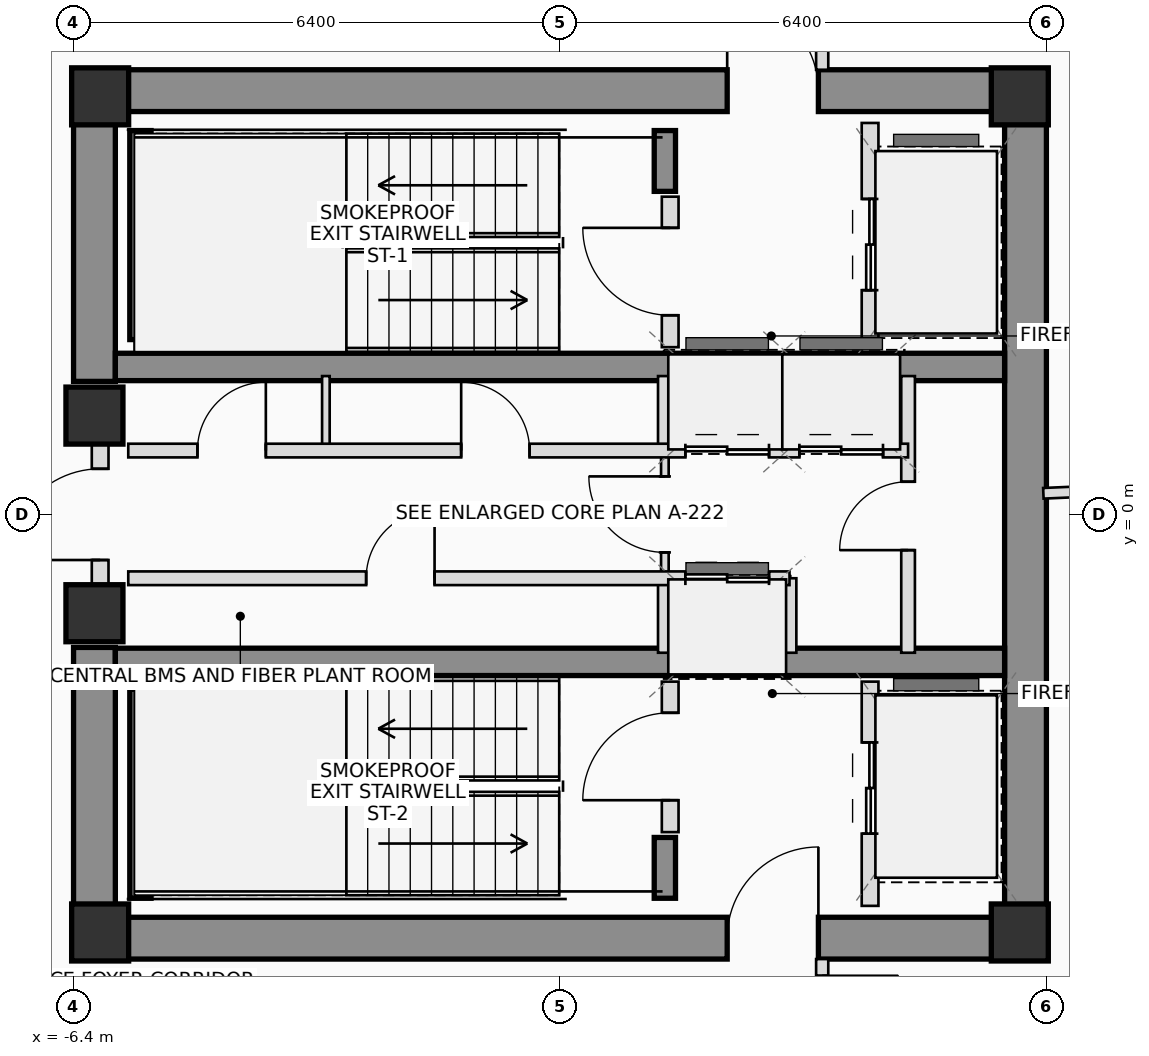
"""IFC4 building model, lengths in metres.
Left out: names, types, materials, properties, quantities, classifications, styles, units other than length and angle.
Written with IfcOpenShell. Run it as: python <this file> out.ifc"""

import sys

from ifc_helpers import new_model, si_unit, direction, frame, frame_2d, origin, origin_2d, place, context, subcontext, project, spatial, rectangle, extrude, source, transform, mapped, element, fill, save


model = new_model("IFC4")
c1 = context("Model", 3, precision=1e-05, world=origin(), true_north=direction((0.0, 1.0)))
c2 = subcontext(c1, "Body", "Model", "MODEL_VIEW")
j1 = project(units=[si_unit("LENGTHUNIT", "METRE"), si_unit("PLANEANGLEUNIT", "RADIAN")], contexts=[c1])
p1 = place(None, origin())
s1 = spatial("IfcSite", under=j1, at=p1, CompositionType="ELEMENT")
p2 = place(p1, origin())
s2 = spatial("IfcBuilding", under=s1, at=p2, CompositionType="ELEMENT")
p3 = place(p2, frame((0.0, 0.0, 242.25)))
s3 = spatial("IfcBuildingStorey", under=s2, at=p3, CompositionType="ELEMENT", Elevation=242.25)
m1 = source(origin(), c2, "Body", "SweptSolid", [
    extrude(rectangle(XDim=0.75, YDim=0.75, at=origin_2d()), origin(), (0.0, 0.0, 1.0), 3.4),
])
for number, where, z_axis, x_axis in (
    (1, (-6.05, -5.5, 0.0), (0.0, 0.0, 1.0), (1.0, 0.0, 0.0)),
    (2, (6.05, -5.5, 0.0), (0.0, 0.0, 1.0), (1.0, 0.0, 0.0)),
    (3, (6.05, 5.5, 0.0), (0.0, 0.0, 1.0), (1.0, 0.0, 0.0)),
    (4, (-6.05, 5.5, 0.0), (0.0, 0.0, 1.0), (1.0, 0.0, 0.0)),
):
    element("IfcColumn", number, at=place(p3, frame(where, z_axis=z_axis, x_axis=x_axis)), inside=s3, PredefinedType="COLUMN", context=c2, shape_type="MappedRepresentation", body=[
        mapped(m1, transform((0.0, 0.0, 0.0), scale=1.0)),
    ])
p4 = place(p3, frame((-6.4, 5.575, 0.0), z_axis=(0.0, 0.0, 1.0), x_axis=(1.0, 0.0, 0.0)))
e5 = element("IfcWall", 5, at=p4, inside=s3, PredefinedType="SHEAR", context=c2, shape_type="SweptSolid", body=[
    extrude(rectangle(XDim=12.8, YDim=0.55, at=frame_2d((6.4, 0.0))), origin(), (0.0, 0.0, 1.0), 3.4),
])
p5 = place(p4, frame((8.6, 0.0, 0.0)))
e6 = element("IfcOpeningElement", 6, at=p5, cuts=e5, PredefinedType="OPENING", context=c2, shape_type="SweptSolid", body=[
    extrude(rectangle(XDim=1.2, YDim=2.2, at=frame_2d((0.6, 1.1))), frame((0.0, 0.285, 0.0), z_axis=(0.0, -1.0, 0.0), x_axis=(1.0, 0.0, 0.0)), (0.0, 0.0, 1.0), 0.57),
])
p6 = place(p3, frame((-6.4, -5.575, 0.0), z_axis=(0.0, 0.0, 1.0), x_axis=(1.0, 0.0, 0.0)))
e7 = element("IfcWall", 7, at=p6, inside=s3, PredefinedType="SHEAR", context=c2, shape_type="SweptSolid", body=[
    extrude(rectangle(XDim=12.8, YDim=0.55, at=frame_2d((6.4, 0.0))), origin(), (0.0, 0.0, 1.0), 3.4),
])
p7 = place(p6, frame((8.6, 0.0, 0.0)))
e8 = element("IfcOpeningElement", 8, at=p7, cuts=e7, PredefinedType="OPENING", context=c2, shape_type="SweptSolid", body=[
    extrude(rectangle(XDim=1.2, YDim=2.2, at=frame_2d((0.6, 1.1))), frame((0.0, 0.285, 0.0), z_axis=(0.0, -1.0, 0.0), x_axis=(1.0, 0.0, 0.0)), (0.0, 0.0, 1.0), 0.57),
])
p8 = place(p3, frame((6.125, -5.3, 0.0), z_axis=(0.0, 0.0, 1.0), x_axis=(0.0, 1.0, 0.0)))
e9 = element("IfcWall", 9, at=p8, inside=s3, PredefinedType="SHEAR", context=c2, shape_type="SweptSolid", body=[
    extrude(rectangle(XDim=10.6, YDim=0.55, at=frame_2d((5.3, 0.0))), origin(), (0.0, 0.0, 1.0), 3.4),
])
for number, where, z_axis, x_axis in (
    (10, (-6.125, -5.3, 0.0), (0.0, 0.0, 1.0), (0.0, 1.0, 0.0)),
    (11, (-6.125, 1.75, 0.0), (0.0, 0.0, 1.0), (0.0, 1.0, 0.0)),
):
    element("IfcWall", number, at=place(p3, frame(where, z_axis=z_axis, x_axis=x_axis)), inside=s3, PredefinedType="SHEAR", context=c2, shape_type="SweptSolid", body=[
        extrude(rectangle(XDim=3.55, YDim=0.55, at=frame_2d((1.775, 0.0))), origin(), (0.0, 0.0, 1.0), 3.4),
    ])
for number, where, z_axis, x_axis in (
    (12, (-5.85, 1.94, 0.0), (0.0, 0.0, 1.0), (1.0, 0.0, 0.0)),
    (13, (-5.85, -1.94, 0.0), (0.0, 0.0, 1.0), (1.0, 0.0, 0.0)),
):
    element("IfcWall", number, at=place(p3, frame(where, z_axis=z_axis, x_axis=x_axis)), inside=s3, PredefinedType="SHEAR", context=c2, shape_type="SweptSolid", body=[
        extrude(rectangle(XDim=11.7, YDim=0.36, at=frame_2d((5.85, 0.0))), origin(), (0.0, 0.0, 1.0), 3.4),
    ])
p9 = place(p3, frame((-5.52, 2.3, 0.0), z_axis=(0.0, 0.0, 1.0), x_axis=(0.0, 1.0, 0.0)))
e14 = element("IfcWall", 14, at=p9, inside=s3, PredefinedType="SHEAR", context=c2, shape_type="SweptSolid", body=[
    extrude(rectangle(XDim=2.75, YDim=0.28, at=frame_2d((1.375, 0.0))), origin(), (0.0, 0.0, 1.0), 3.4),
])
p10 = place(p3, frame((1.38, 4.25, 0.0), z_axis=(0.0, 0.0, 1.0), x_axis=(0.0, 1.0, 0.0)))
e15 = element("IfcWall", 15, at=p10, inside=s3, PredefinedType="SHEAR", context=c2, shape_type="SweptSolid", body=[
    extrude(rectangle(XDim=0.8, YDim=0.28, at=frame_2d((0.4, 0.0))), origin(), (0.0, 0.0, 1.0), 3.4),
])
p11 = place(p3, frame((-5.52, -5.05, 0.0), z_axis=(0.0, 0.0, 1.0), x_axis=(0.0, 1.0, 0.0)))
e16 = element("IfcWall", 16, at=p11, inside=s3, PredefinedType="SHEAR", context=c2, shape_type="SweptSolid", body=[
    extrude(rectangle(XDim=2.75, YDim=0.28, at=frame_2d((1.375, 0.0))), origin(), (0.0, 0.0, 1.0), 3.4),
])
p12 = place(p3, frame((1.38, -5.05, 0.0), z_axis=(0.0, 0.0, 1.0), x_axis=(0.0, 1.0, 0.0)))
e17 = element("IfcWall", 17, at=p12, inside=s3, PredefinedType="SHEAR", context=c2, shape_type="SweptSolid", body=[
    extrude(rectangle(XDim=0.8, YDim=0.28, at=frame_2d((0.4, 0.0))), origin(), (0.0, 0.0, 1.0), 3.4),
])
for number, where, z_axis, x_axis in (
    (18, (-6.125, -1.3, 0.0), (0.0, 0.0, 1.0), (1.0, 0.0, 0.0)),
    (19, (-6.125, 1.3, 0.0), (0.0, 0.0, 1.0), (1.0, 0.0, 0.0)),
):
    element("IfcColumn", number, at=place(p3, frame(where, z_axis=z_axis, x_axis=x_axis)), inside=s3, PredefinedType="COLUMN", context=c2, shape_type="MappedRepresentation", body=[
        mapped(m1, transform((0.0, 0.0, 0.0), scale=1.0)),
    ])
p13 = place(p3, frame((-6.05, -0.95, 0.0), z_axis=(0.0, 0.0, 1.0), x_axis=(0.0, 1.0, 0.0)))
e20 = element("IfcWall", 20, at=p13, inside=s3, PredefinedType="PLUMBINGWALL", context=c2, shape_type="SweptSolid", body=[
    extrude(rectangle(XDim=1.9, YDim=0.22, at=frame_2d((0.95, 0.0))), origin(), (0.0, 0.0, 1.0), 2.18),
])
p14 = place(p13, frame((0.35, 0.0, 0.0)))
e21 = element("IfcOpeningElement", 21, at=p14, cuts=e20, PredefinedType="OPENING", context=c2, shape_type="SweptSolid", body=[
    extrude(rectangle(XDim=1.2, YDim=2.2, at=frame_2d((0.6, 1.1))), frame((0.0, 0.12, 0.0), z_axis=(0.0, -1.0, 0.0), x_axis=(1.0, 0.0, 0.0)), (0.0, 0.0, 1.0), 0.24),
])
p15 = place(p3, frame((1.45, 2.2, 0.0), z_axis=(0.0, 0.0, 1.0), x_axis=(0.0, 1.0, 0.0)))
e22 = element("IfcWall", 22, at=p15, inside=s3, PredefinedType="PLUMBINGWALL", context=c2, shape_type="SweptSolid", body=[
    extrude(rectangle(XDim=1.98, YDim=0.22, at=frame_2d((0.99, 0.0))), origin(), (0.0, 0.0, 1.0), 3.2),
])
p16 = place(p15, frame((0.42, 0.0, 0.0)))
e23 = element("IfcOpeningElement", 23, at=p16, cuts=e22, PredefinedType="OPENING", context=c2, shape_type="SweptSolid", body=[
    extrude(rectangle(XDim=1.15, YDim=2.15, at=frame_2d((0.575, 1.075))), frame((0.0, 0.12, 0.0), z_axis=(0.0, -1.0, 0.0), x_axis=(1.0, 0.0, 0.0)), (0.0, 0.0, 1.0), 0.24),
])
p17 = place(p3, frame((4.08, 2.2, 0.0), z_axis=(0.0, 0.0, 1.0), x_axis=(0.0, 1.0, 0.0)))
e24 = element("IfcWall", 24, at=p17, inside=s3, PredefinedType="PLUMBINGWALL", context=c2, shape_type="SweptSolid", body=[
    extrude(rectangle(XDim=2.95, YDim=0.22, at=frame_2d((1.475, 0.0))), origin(), (0.0, 0.0, 1.0), 3.2),
])
p18 = place(p17, frame((0.75, 0.0, 0.0)))
e25 = element("IfcOpeningElement", 25, at=p18, cuts=e24, PredefinedType="OPENING", context=c2, shape_type="SweptSolid", body=[
    extrude(rectangle(XDim=1.2, YDim=2.25, at=frame_2d((0.6, 1.125))), frame((0.0, 0.12, 0.0), z_axis=(0.0, -1.0, 0.0), x_axis=(1.0, 0.0, 0.0)), (0.0, 0.0, 1.0), 0.24),
])
p19 = place(p3, frame((1.45, -4.18, 0.0), z_axis=(0.0, 0.0, 1.0), x_axis=(0.0, 1.0, 0.0)))
e26 = element("IfcWall", 26, at=p19, inside=s3, PredefinedType="PLUMBINGWALL", context=c2, shape_type="SweptSolid", body=[
    extrude(rectangle(XDim=1.98, YDim=0.22, at=frame_2d((0.99, 0.0))), origin(), (0.0, 0.0, 1.0), 3.2),
])
p20 = place(p19, frame((0.42, 0.0, 0.0)))
e27 = element("IfcOpeningElement", 27, at=p20, cuts=e26, PredefinedType="OPENING", context=c2, shape_type="SweptSolid", body=[
    extrude(rectangle(XDim=1.15, YDim=2.15, at=frame_2d((0.575, 1.075))), frame((0.0, 0.12, 0.0), z_axis=(0.0, -1.0, 0.0), x_axis=(1.0, 0.0, 0.0)), (0.0, 0.0, 1.0), 0.24),
])
p21 = place(p3, frame((4.08, -5.15, 0.0), z_axis=(0.0, 0.0, 1.0), x_axis=(0.0, 1.0, 0.0)))
e28 = element("IfcWall", 28, at=p21, inside=s3, PredefinedType="PLUMBINGWALL", context=c2, shape_type="SweptSolid", body=[
    extrude(rectangle(XDim=2.95, YDim=0.22, at=frame_2d((1.475, 0.0))), origin(), (0.0, 0.0, 1.0), 3.2),
])
p22 = place(p21, frame((0.95, 0.0, 0.0)))
e29 = element("IfcOpeningElement", 29, at=p22, cuts=e28, PredefinedType="OPENING", context=c2, shape_type="SweptSolid", body=[
    extrude(rectangle(XDim=1.2, YDim=2.25, at=frame_2d((0.6, 1.125))), frame((0.0, 0.12, 0.0), z_axis=(0.0, -1.0, 0.0), x_axis=(1.0, 0.0, 0.0)), (0.0, 0.0, 1.0), 0.24),
])
p23 = place(p3, frame((1.38, -0.84, 0.0), z_axis=(0.0, 0.0, 1.0), x_axis=(0.0, 1.0, 0.0)))
e30 = element("IfcWall", 30, at=p23, inside=s3, PredefinedType="PARTITIONING", context=c2, shape_type="SweptSolid", body=[
    extrude(rectangle(XDim=1.68, YDim=0.1, at=frame_2d((0.84, 0.0))), origin(), (0.0, 0.0, 1.0), 3.2),
])
p24 = place(p23, frame((0.34, 0.0, 0.0)))
e31 = element("IfcOpeningElement", 31, at=p24, cuts=e30, PredefinedType="OPENING", context=c2, shape_type="SweptSolid", body=[
    extrude(rectangle(XDim=1.0, YDim=2.25, at=frame_2d((0.5, 1.125))), frame((0.0, 0.06, 0.0), z_axis=(0.0, -1.0, 0.0), x_axis=(1.0, 0.0, 0.0)), (0.0, 0.0, 1.0), 0.12),
])
p25 = place(p3, frame((-3.08, 0.84, 0.0), z_axis=(0.0, 0.0, 1.0), x_axis=(0.0, 1.0, 0.0)))
e32 = element("IfcWall", 32, at=p25, inside=s3, PredefinedType="PARTITIONING", context=c2, shape_type="SweptSolid", body=[
    extrude(rectangle(XDim=0.98, YDim=0.1, at=frame_2d((0.49, 0.0))), origin(), (0.0, 0.0, 1.0), 3.2),
])
for number, where, z_axis, x_axis in (
    (33, (1.38, 0.84, 0.0), (0.0, 0.0, 1.0), (0.0, 1.0, 0.0)),
    (34, (1.38, -1.82, 0.0), (0.0, 0.0, 1.0), (0.0, 1.0, 0.0)),
    (35, (3.02, 0.84, 0.0), (0.0, 0.0, 1.0), (0.0, 1.0, 0.0)),
    (36, (4.38, 0.84, 0.0), (0.0, 0.0, 1.0), (0.0, 1.0, 0.0)),
    (37, (3.02, -1.82, 0.0), (0.0, 0.0, 1.0), (0.0, 1.0, 0.0)),
):
    element("IfcWall", number, at=place(p3, frame(where, z_axis=z_axis, x_axis=x_axis)), inside=s3, PredefinedType="PLUMBINGWALL", context=c2, shape_type="SweptSolid", body=[
        extrude(rectangle(XDim=0.98, YDim=0.18, at=frame_2d((0.49, 0.0))), origin(), (0.0, 0.0, 1.0), 3.2),
    ])
p26 = place(p3, frame((4.58, -1.82, 0.0), z_axis=(0.0, 0.0, 1.0), x_axis=(0.0, 1.0, 0.0)))
e38 = element("IfcWall", 38, at=p26, inside=s3, PredefinedType="PLUMBINGWALL", context=c2, shape_type="SweptSolid", body=[
    extrude(rectangle(XDim=3.64, YDim=0.18, at=frame_2d((1.82, 0.0))), origin(), (0.0, 0.0, 1.0), 3.2),
])
p27 = place(p26, frame((1.35, 0.0, 0.0)))
e39 = element("IfcOpeningElement", 39, at=p27, cuts=e38, PredefinedType="OPENING", context=c2, shape_type="SweptSolid", body=[
    extrude(rectangle(XDim=0.9, YDim=2.05, at=frame_2d((0.45, 1.025))), frame((0.0, 0.1, 0.0), z_axis=(0.0, -1.0, 0.0), x_axis=(1.0, 0.0, 0.0)), (0.0, 0.0, 1.0), 0.2),
])
p28 = place(p3, frame((-5.68, 0.84, 0.0), z_axis=(0.0, 0.0, 1.0), x_axis=(1.0, 0.0, 0.0)))
e40 = element("IfcWall", 40, at=p28, inside=s3, PredefinedType="PLUMBINGWALL", context=c2, shape_type="SweptSolid", body=[
    extrude(rectangle(XDim=10.26, YDim=0.18, at=frame_2d((5.13, 0.0))), origin(), (0.0, 0.0, 1.0), 3.2),
])
p29 = place(p28, frame((0.91, 0.0, 0.0)))
e41 = element("IfcOpeningElement", 41, at=p29, cuts=e40, PredefinedType="OPENING", context=c2, shape_type="SweptSolid", body=[
    extrude(rectangle(XDim=0.9, YDim=2.05, at=frame_2d((0.45, 1.025))), frame((0.0, 0.1, 0.0), z_axis=(0.0, -1.0, 0.0), x_axis=(1.0, 0.0, 0.0)), (0.0, 0.0, 1.0), 0.2),
])
p30 = place(p28, frame((4.38, 0.0, 0.0)))
e42 = element("IfcOpeningElement", 42, at=p30, cuts=e40, PredefinedType="OPENING", context=c2, shape_type="SweptSolid", body=[
    extrude(rectangle(XDim=0.9, YDim=2.05, at=frame_2d((0.45, 1.025))), frame((0.0, 0.1, 0.0), z_axis=(0.0, -1.0, 0.0), x_axis=(1.0, 0.0, 0.0)), (0.0, 0.0, 1.0), 0.2),
])
p31 = place(p28, frame((7.33, 0.0, 0.0)))
e43 = element("IfcOpeningElement", 43, at=p31, cuts=e40, PredefinedType="OPENING", context=c2, shape_type="SweptSolid", body=[
    extrude(rectangle(XDim=1.1, YDim=2.2, at=frame_2d((0.55, 1.1))), frame((0.0, 0.1, 0.0), z_axis=(0.0, -1.0, 0.0), x_axis=(1.0, 0.0, 0.0)), (0.0, 0.0, 1.0), 0.2),
])
p32 = place(p28, frame((8.83, 0.0, 0.0)))
e44 = element("IfcOpeningElement", 44, at=p32, cuts=e40, PredefinedType="OPENING", context=c2, shape_type="SweptSolid", body=[
    extrude(rectangle(XDim=1.1, YDim=2.2, at=frame_2d((0.55, 1.1))), frame((0.0, 0.1, 0.0), z_axis=(0.0, -1.0, 0.0), x_axis=(1.0, 0.0, 0.0)), (0.0, 0.0, 1.0), 0.2),
])
p33 = place(p3, frame((-5.68, -0.84, 0.0), z_axis=(0.0, 0.0, 1.0), x_axis=(1.0, 0.0, 0.0)))
e45 = element("IfcWall", 45, at=p33, inside=s3, PredefinedType="PLUMBINGWALL", context=c2, shape_type="SweptSolid", body=[
    extrude(rectangle(XDim=8.7, YDim=0.18, at=frame_2d((4.35, 0.0))), origin(), (0.0, 0.0, 1.0), 3.2),
])
p34 = place(p33, frame((3.13, 0.0, 0.0)))
e46 = element("IfcOpeningElement", 46, at=p34, cuts=e45, PredefinedType="OPENING", context=c2, shape_type="SweptSolid", body=[
    extrude(rectangle(XDim=0.9, YDim=2.05, at=frame_2d((0.45, 1.025))), frame((0.0, 0.1, 0.0), z_axis=(0.0, -1.0, 0.0), x_axis=(1.0, 0.0, 0.0)), (0.0, 0.0, 1.0), 0.2),
])
p35 = place(p33, frame((7.33, 0.0, 0.0)))
e47 = element("IfcOpeningElement", 47, at=p35, cuts=e45, PredefinedType="OPENING", context=c2, shape_type="SweptSolid", body=[
    extrude(rectangle(XDim=1.1, YDim=2.2, at=frame_2d((0.55, 1.1))), frame((0.0, 0.1, 0.0), z_axis=(0.0, -1.0, 0.0), x_axis=(1.0, 0.0, 0.0)), (0.0, 0.0, 1.0), 0.2),
])
p36 = place(p3, frame((3.45, 7.49, 0.0), z_axis=(0.0, 0.0, 1.0), x_axis=(0.0, -1.0, 0.0)))
e48 = element("IfcWall", 48, at=p36, inside=s3, PredefinedType="PARTITIONING", context=c2, shape_type="SweptSolid", body=[
    extrude(rectangle(XDim=1.64, YDim=0.16, at=frame_2d((0.82, 0.0))), origin(), (0.0, 0.0, 1.0), 3.2),
])
p37 = place(p3, frame((3.45, -5.85, 0.0), z_axis=(0.0, 0.0, 1.0), x_axis=(0.0, -1.0, 0.0)))
e49 = element("IfcWall", 49, at=p37, inside=s3, PredefinedType="PARTITIONING", context=c2, shape_type="SweptSolid", body=[
    extrude(rectangle(XDim=1.64, YDim=0.16, at=frame_2d((0.82, 0.0))), origin(), (0.0, 0.0, 1.0), 3.2),
])
p38 = place(p37, frame((0.22, 0.0, 0.0)))
e50 = element("IfcOpeningElement", 50, at=p38, cuts=e49, PredefinedType="OPENING", context=c2, shape_type="SweptSolid", body=[
    extrude(rectangle(XDim=1.0, YDim=2.25, at=frame_2d((0.5, 1.125))), frame((0.0, 0.09, 0.0), z_axis=(0.0, -1.0, 0.0), x_axis=(1.0, 0.0, 0.0)), (0.0, 0.0, 1.0), 0.18),
])
p39 = place(p3, frame((6.36, 0.278, 0.0), z_axis=(0.0, 0.0, 1.0), x_axis=(0.999048037217, 0.043623609819, 0.0)))
e51 = element("IfcWall", 51, at=p39, inside=s3, PredefinedType="PARTITIONING", context=c2, shape_type="SweptSolid", body=[
    extrude(rectangle(XDim=2.899, YDim=0.14, at=frame_2d((1.449, 0.0))), origin(), (0.0, 0.0, 1.0), 3.2),
])
p40 = place(p5, origin())
e52 = element("IfcDoor", 52, at=p40, inside=s3, OperationType="SINGLE_SWING_LEFT", PredefinedType="DOOR", context=c2, shape_type="SweptSolid", body=[
    extrude(rectangle(XDim=1.2, YDim=2.2, at=frame_2d((0.6, 1.1))), frame((0.0, 0.025, 0.0), z_axis=(0.0, -1.0, 0.0), x_axis=(1.0, 0.0, 0.0)), (0.0, 0.0, 1.0), 0.05),
])
fill(e6, e52)
p41 = place(p7, origin())
e53 = element("IfcDoor", 53, at=p41, inside=s3, OperationType="SINGLE_SWING_RIGHT", PredefinedType="DOOR", context=c2, shape_type="SweptSolid", body=[
    extrude(rectangle(XDim=1.2, YDim=2.2, at=frame_2d((0.6, 1.1))), frame((0.0, 0.025, 0.0), z_axis=(0.0, -1.0, 0.0), x_axis=(1.0, 0.0, 0.0)), (0.0, 0.0, 1.0), 0.05),
])
fill(e8, e53)
p42 = place(p14, origin())
e54 = element("IfcDoor", 54, at=p42, inside=s3, OperationType="SINGLE_SWING_LEFT", PredefinedType="DOOR", context=c2, shape_type="SweptSolid", body=[
    extrude(rectangle(XDim=1.2, YDim=2.2, at=frame_2d((0.6, 1.1))), frame((0.0, 0.025, 0.0), z_axis=(0.0, -1.0, 0.0), x_axis=(1.0, 0.0, 0.0)), (0.0, 0.0, 1.0), 0.05),
])
fill(e21, e54)
p43 = place(p16, origin())
e55 = element("IfcDoor", 55, at=p43, inside=s3, OperationType="SINGLE_SWING_RIGHT", PredefinedType="DOOR", context=c2, shape_type="SweptSolid", body=[
    extrude(rectangle(XDim=1.15, YDim=2.15, at=frame_2d((0.575, 1.075))), frame((0.0, 0.025, 0.0), z_axis=(0.0, -1.0, 0.0), x_axis=(1.0, 0.0, 0.0)), (0.0, 0.0, 1.0), 0.05),
])
fill(e23, e55)
p44 = place(p18, origin())
e56 = element("IfcDoor", 56, at=p44, inside=s3, OperationType="DOUBLE_DOOR_SLIDING", PredefinedType="DOOR", context=c2, shape_type="SweptSolid", body=[
    extrude(rectangle(XDim=1.2, YDim=2.25, at=frame_2d((0.6, 1.125))), frame((0.0, 0.025, 0.0), z_axis=(0.0, -1.0, 0.0), x_axis=(1.0, 0.0, 0.0)), (0.0, 0.0, 1.0), 0.05),
])
fill(e25, e56)
p45 = place(p20, origin())
e57 = element("IfcDoor", 57, at=p45, inside=s3, OperationType="SINGLE_SWING_LEFT", PredefinedType="DOOR", context=c2, shape_type="SweptSolid", body=[
    extrude(rectangle(XDim=1.15, YDim=2.15, at=frame_2d((0.575, 1.075))), frame((0.0, 0.025, 0.0), z_axis=(0.0, -1.0, 0.0), x_axis=(1.0, 0.0, 0.0)), (0.0, 0.0, 1.0), 0.05),
])
fill(e27, e57)
p46 = place(p22, origin())
e58 = element("IfcDoor", 58, at=p46, inside=s3, OperationType="DOUBLE_DOOR_SLIDING", PredefinedType="DOOR", context=c2, shape_type="SweptSolid", body=[
    extrude(rectangle(XDim=1.2, YDim=2.25, at=frame_2d((0.6, 1.125))), frame((0.0, 0.025, 0.0), z_axis=(0.0, -1.0, 0.0), x_axis=(1.0, 0.0, 0.0)), (0.0, 0.0, 1.0), 0.05),
])
fill(e29, e58)
p47 = place(p24, origin())
e59 = element("IfcDoor", 59, at=p47, inside=s3, OperationType="SINGLE_SWING_RIGHT", PredefinedType="DOOR", context=c2, shape_type="SweptSolid", body=[
    extrude(rectangle(XDim=1.0, YDim=2.25, at=frame_2d((0.5, 1.125))), frame((0.0, 0.025, 0.0), z_axis=(0.0, -1.0, 0.0), x_axis=(1.0, 0.0, 0.0)), (0.0, 0.0, 1.0), 0.05),
])
fill(e31, e59)
p48 = place(p27, origin())
e60 = element("IfcDoor", 60, at=p48, inside=s3, OperationType="SINGLE_SWING_LEFT", PredefinedType="DOOR", context=c2, shape_type="SweptSolid", body=[
    extrude(rectangle(XDim=0.9, YDim=2.05, at=frame_2d((0.45, 1.025))), frame((0.0, 0.025, 0.0), z_axis=(0.0, -1.0, 0.0), x_axis=(1.0, 0.0, 0.0)), (0.0, 0.0, 1.0), 0.05),
])
fill(e39, e60)
p49 = place(p29, origin())
e61 = element("IfcDoor", 61, at=p49, inside=s3, OperationType="SINGLE_SWING_RIGHT", PredefinedType="DOOR", context=c2, shape_type="SweptSolid", body=[
    extrude(rectangle(XDim=0.9, YDim=2.05, at=frame_2d((0.45, 1.025))), frame((0.0, 0.025, 0.0), z_axis=(0.0, -1.0, 0.0), x_axis=(1.0, 0.0, 0.0)), (0.0, 0.0, 1.0), 0.05),
])
fill(e41, e61)
p50 = place(p30, origin())
e62 = element("IfcDoor", 62, at=p50, inside=s3, OperationType="SINGLE_SWING_LEFT", PredefinedType="DOOR", context=c2, shape_type="SweptSolid", body=[
    extrude(rectangle(XDim=0.9, YDim=2.05, at=frame_2d((0.45, 1.025))), frame((0.0, 0.025, 0.0), z_axis=(0.0, -1.0, 0.0), x_axis=(1.0, 0.0, 0.0)), (0.0, 0.0, 1.0), 0.05),
])
fill(e42, e62)
p51 = place(p31, origin())
e63 = element("IfcDoor", 63, at=p51, inside=s3, OperationType="DOUBLE_DOOR_SLIDING", PredefinedType="DOOR", context=c2, shape_type="SweptSolid", body=[
    extrude(rectangle(XDim=1.1, YDim=2.2, at=frame_2d((0.55, 1.1))), frame((0.0, 0.025, 0.0), z_axis=(0.0, -1.0, 0.0), x_axis=(1.0, 0.0, 0.0)), (0.0, 0.0, 1.0), 0.05),
])
fill(e43, e63)
p52 = place(p32, origin())
e64 = element("IfcDoor", 64, at=p52, inside=s3, OperationType="DOUBLE_DOOR_SLIDING", PredefinedType="DOOR", context=c2, shape_type="SweptSolid", body=[
    extrude(rectangle(XDim=1.1, YDim=2.2, at=frame_2d((0.55, 1.1))), frame((0.0, 0.025, 0.0), z_axis=(0.0, -1.0, 0.0), x_axis=(1.0, 0.0, 0.0)), (0.0, 0.0, 1.0), 0.05),
])
fill(e44, e64)
p53 = place(p34, origin())
e65 = element("IfcDoor", 65, at=p53, inside=s3, OperationType="SINGLE_SWING_RIGHT", PredefinedType="DOOR", context=c2, shape_type="SweptSolid", body=[
    extrude(rectangle(XDim=0.9, YDim=2.05, at=frame_2d((0.45, 1.025))), frame((0.0, 0.025, 0.0), z_axis=(0.0, -1.0, 0.0), x_axis=(1.0, 0.0, 0.0)), (0.0, 0.0, 1.0), 0.05),
])
fill(e46, e65)
p54 = place(p35, origin())
e66 = element("IfcDoor", 66, at=p54, inside=s3, OperationType="DOUBLE_DOOR_SLIDING", PredefinedType="DOOR", context=c2, shape_type="SweptSolid", body=[
    extrude(rectangle(XDim=1.1, YDim=2.2, at=frame_2d((0.55, 1.1))), frame((0.0, 0.025, 0.0), z_axis=(0.0, -1.0, 0.0), x_axis=(1.0, 0.0, 0.0)), (0.0, 0.0, 1.0), 0.05),
])
fill(e47, e66)
p55 = place(p38, origin())
e67 = element("IfcDoor", 67, at=p55, inside=s3, OperationType="SINGLE_SWING_LEFT", PredefinedType="DOOR", context=c2, shape_type="SweptSolid", body=[
    extrude(rectangle(XDim=1.0, YDim=2.25, at=frame_2d((0.5, 1.125))), frame((0.0, 0.025, 0.0), z_axis=(0.0, -1.0, 0.0), x_axis=(1.0, 0.0, 0.0)), (0.0, 0.0, 1.0), 0.05),
])
fill(e50, e67)
save(model, sys.argv[1])
